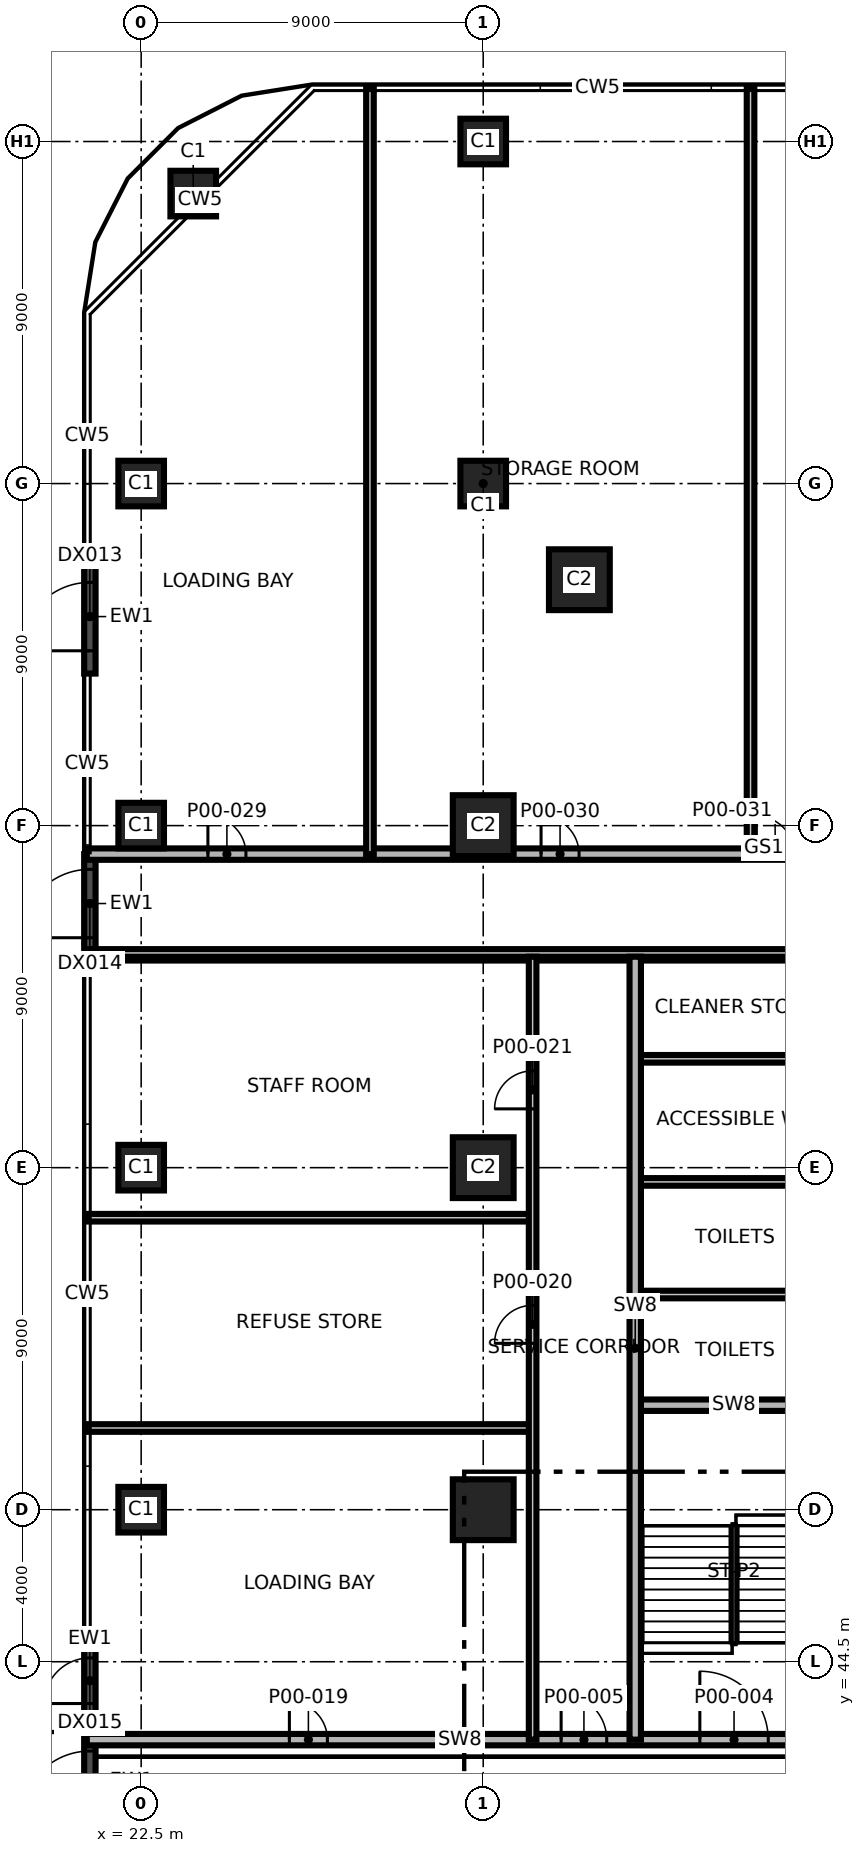
"""IFC4 building model, lengths in metres.
Left out: names, types, materials, properties, quantities, classifications, styles, units other than length and angle.
Written with IfcOpenShell. Run it as: python <this file> out.ifc"""

import sys

from ifc_helpers import new_model, si_unit, direction, frame, frame_2d, origin, origin_2d, place, context, subcontext, project, spatial, rectangle, extrude, element, fill, save


model = new_model("IFC4")
c1 = context("Model", 3, precision=1e-05, world=origin(), true_north=direction((0.0, 1.0)))
c2 = subcontext(c1, "Body", "Model", "MODEL_VIEW")
j1 = project(units=[si_unit("LENGTHUNIT", "METRE"), si_unit("PLANEANGLEUNIT", "RADIAN")], contexts=[c1])
p1 = place(None, origin())
s1 = spatial("IfcSite", under=j1, at=p1, CompositionType="ELEMENT")
p2 = place(p1, origin())
s2 = spatial("IfcBuilding", under=s1, at=p2, CompositionType="ELEMENT")
p3 = place(p2, origin())
s3 = spatial("IfcBuildingStorey", under=s2, at=p3, CompositionType="ELEMENT", Elevation=0.0)
p4 = place(p3, frame((22.5, 48.5, 0.0), z_axis=(0.0, 0.0, 1.0), x_axis=(1.0, 0.0, 0.0)))
e1 = element("IfcColumn", 1, at=p4, inside=s3, PredefinedType="COLUMN", context=c2, shape_type="SweptSolid", body=[
    extrude(rectangle(XDim=1.2, YDim=1.2, at=origin_2d()), origin(), (0.0, 0.0, 1.0), 8.0),
])
p5 = place(p3, frame((31.5, 48.5, 0.0), z_axis=(0.0, 0.0, 1.0), x_axis=(1.0, 0.0, 0.0)))
e2 = element("IfcColumn", 2, at=p5, inside=s3, PredefinedType="COLUMN", context=c2, shape_type="SweptSolid", body=[
    extrude(rectangle(XDim=1.6, YDim=1.6, at=origin_2d()), origin(), (0.0, 0.0, 1.0), 8.0),
])
p6 = place(p3, frame((22.5, 57.5, 0.0), z_axis=(0.0, 0.0, 1.0), x_axis=(1.0, 0.0, 0.0)))
e3 = element("IfcColumn", 3, at=p6, inside=s3, PredefinedType="COLUMN", context=c2, shape_type="SweptSolid", body=[
    extrude(rectangle(XDim=1.2, YDim=1.2, at=origin_2d()), origin(), (0.0, 0.0, 1.0), 8.0),
])
p7 = place(p3, frame((31.5, 57.5, 0.0), z_axis=(0.0, 0.0, 1.0), x_axis=(1.0, 0.0, 0.0)))
e4 = element("IfcColumn", 4, at=p7, inside=s3, PredefinedType="COLUMN", context=c2, shape_type="SweptSolid", body=[
    extrude(rectangle(XDim=1.6, YDim=1.6, at=origin_2d()), origin(), (0.0, 0.0, 1.0), 8.0),
])
p8 = place(p3, frame((22.5, 66.5, 0.0), z_axis=(0.0, 0.0, 1.0), x_axis=(1.0, 0.0, 0.0)))
e5 = element("IfcColumn", 5, at=p8, inside=s3, PredefinedType="COLUMN", context=c2, shape_type="SweptSolid", body=[
    extrude(rectangle(XDim=1.2, YDim=1.2, at=origin_2d()), origin(), (0.0, 0.0, 1.0), 8.0),
])
p9 = place(p3, frame((31.5, 66.5, 0.0), z_axis=(0.0, 0.0, 1.0), x_axis=(1.0, 0.0, 0.0)))
e6 = element("IfcColumn", 6, at=p9, inside=s3, PredefinedType="COLUMN", context=c2, shape_type="SweptSolid", body=[
    extrude(rectangle(XDim=1.6, YDim=1.6, at=origin_2d()), origin(), (0.0, 0.0, 1.0), 8.0),
])
for number, where, z_axis, x_axis in (
    (7, (22.5, 75.5, 0.0), (0.0, 0.0, 1.0), (1.0, 0.0, 0.0)),
    (8, (31.5, 75.5, 0.0), (0.0, 0.0, 1.0), (1.0, 0.0, 0.0)),
    (9, (23.87, 83.13, 0.0), (0.0, 0.0, 1.0), (1.0, 0.0, 0.0)),
    (10, (31.5, 84.5, 0.0), (0.0, 0.0, 1.0), (1.0, 0.0, 0.0)),
):
    element("IfcColumn", number, at=place(p3, frame(where, z_axis=z_axis, x_axis=x_axis)), inside=s3, PredefinedType="COLUMN", context=c2, shape_type="SweptSolid", body=[
        extrude(rectangle(XDim=1.2, YDim=1.2, at=origin_2d()), origin(), (0.0, 0.0, 1.0), 8.0),
    ])
p10 = place(p3, frame((34.03, 72.97, 0.0), z_axis=(0.0, 0.0, 1.0), x_axis=(1.0, 0.0, 0.0)))
e11 = element("IfcColumn", 11, at=p10, inside=s3, PredefinedType="COLUMN", context=c2, shape_type="SweptSolid", body=[
    extrude(rectangle(XDim=1.6, YDim=1.6, at=origin_2d()), origin(), (0.0, 0.0, 1.0), 8.0),
])
p11 = place(p3, frame((21.15, 70.5, 0.0), z_axis=(0.0, 0.0, 1.0), x_axis=(0.0, 1.0, 0.0)))
e12 = element("IfcWall", 12, at=p11, inside=s3, PredefinedType="SOLIDWALL", context=c2, shape_type="SweptSolid", body=[
    extrude(rectangle(XDim=3.0, YDim=0.3, at=frame_2d((1.5, 0.0))), origin(), (0.0, 0.0, 1.0), 7.7),
])
p12 = place(p11, frame((0.6, 0.0, 0.0)))
e13 = element("IfcOpeningElement", 13, at=p12, cuts=e12, PredefinedType="OPENING", context=c2, shape_type="SweptSolid", body=[
    extrude(rectangle(XDim=1.8, YDim=2.4, at=frame_2d((0.9, 1.2))), frame((0.0, 0.16, 0.0), z_axis=(0.0, -1.0, 0.0), x_axis=(1.0, 0.0, 0.0)), (0.0, 0.0, 1.0), 0.32),
])
p13 = place(p3, frame((21.15, 63.15, 0.0), z_axis=(0.0, 0.0, 1.0), x_axis=(0.0, 1.0, 0.0)))
e14 = element("IfcWall", 14, at=p13, inside=s3, PredefinedType="SOLIDWALL", context=c2, shape_type="SweptSolid", body=[
    extrude(rectangle(XDim=2.6, YDim=0.3, at=frame_2d((1.3, 0.0))), origin(), (0.0, 0.0, 1.0), 7.7),
])
p14 = place(p13, frame((0.4, 0.0, 0.0)))
e15 = element("IfcOpeningElement", 15, at=p14, cuts=e14, PredefinedType="OPENING", context=c2, shape_type="SweptSolid", body=[
    extrude(rectangle(XDim=1.8, YDim=2.4, at=frame_2d((0.9, 1.2))), frame((0.0, 0.16, 0.0), z_axis=(0.0, -1.0, 0.0), x_axis=(1.0, 0.0, 0.0)), (0.0, 0.0, 1.0), 0.32),
])
p15 = place(p3, frame((21.15, 42.8, 0.0), z_axis=(0.0, 0.0, 1.0), x_axis=(0.0, 1.0, 0.0)))
e16 = element("IfcWall", 16, at=p15, inside=s3, PredefinedType="SOLIDWALL", context=c2, shape_type="SweptSolid", body=[
    extrude(rectangle(XDim=2.4, YDim=0.3, at=frame_2d((1.2, 0.0))), origin(), (0.0, 0.0, 1.0), 7.7),
])
p16 = place(p15, frame((0.6, 0.0, 0.0)))
e17 = element("IfcOpeningElement", 17, at=p16, cuts=e16, PredefinedType="OPENING", context=c2, shape_type="SweptSolid", body=[
    extrude(rectangle(XDim=1.2, YDim=2.4, at=frame_2d((0.6, 1.2))), frame((0.0, 0.16, 0.0), z_axis=(0.0, -1.0, 0.0), x_axis=(1.0, 0.0, 0.0)), (0.0, 0.0, 1.0), 0.32),
])
p17 = place(p3, frame((21.15, 40.05, 0.0), z_axis=(0.0, 0.0, 1.0), x_axis=(0.0, 1.0, 0.0)))
e18 = element("IfcWall", 18, at=p17, inside=s3, PredefinedType="SOLIDWALL", context=c2, shape_type="SweptSolid", body=[
    extrude(rectangle(XDim=2.6, YDim=0.3, at=frame_2d((1.3, 0.0))), origin(), (0.0, 0.0, 1.0), 7.7),
])
p18 = place(p17, frame((0.3, 0.0, 0.0)))
e19 = element("IfcOpeningElement", 19, at=p18, cuts=e18, PredefinedType="OPENING", context=c2, shape_type="SweptSolid", body=[
    extrude(rectangle(XDim=1.8, YDim=2.4, at=frame_2d((0.9, 1.2))), frame((0.0, 0.16, 0.0), z_axis=(0.0, -1.0, 0.0), x_axis=(1.0, 0.0, 0.0)), (0.0, 0.0, 1.0), 0.32),
])
p19 = place(p3, frame((21.07, 42.45, 0.0), z_axis=(0.0, 0.0, 1.0), x_axis=(1.0, 0.0, 0.0)))
e20 = element("IfcWall", 20, at=p19, inside=s3, PredefinedType="SHEAR", context=c2, shape_type="SweptSolid", body=[
    extrude(rectangle(XDim=19.63, YDim=0.3, at=frame_2d((9.815, 0.0))), origin(), (0.0, 0.0, 1.0), 7.7),
])
p20 = place(p19, frame((16.13, 0.0, 0.0)))
e21 = element("IfcOpeningElement", 21, at=p20, cuts=e20, PredefinedType="OPENING", context=c2, shape_type="SweptSolid", body=[
    extrude(rectangle(XDim=1.8, YDim=2.1, at=frame_2d((0.9, 1.05))), frame((0.0, 0.16, 0.0), z_axis=(0.0, -1.0, 0.0), x_axis=(1.0, 0.0, 0.0)), (0.0, 0.0, 1.0), 0.32),
])
p21 = place(p19, frame((12.48, 0.0, 0.0)))
e22 = element("IfcOpeningElement", 22, at=p21, cuts=e20, PredefinedType="OPENING", context=c2, shape_type="SweptSolid", body=[
    extrude(rectangle(XDim=1.2, YDim=2.1, at=frame_2d((0.6, 1.05))), frame((0.0, 0.16, 0.0), z_axis=(0.0, -1.0, 0.0), x_axis=(1.0, 0.0, 0.0)), (0.0, 0.0, 1.0), 0.32),
])
p22 = place(p19, frame((5.33, 0.0, 0.0)))
e23 = element("IfcOpeningElement", 23, at=p22, cuts=e20, PredefinedType="OPENING", context=c2, shape_type="SweptSolid", body=[
    extrude(rectangle(XDim=1.0, YDim=2.1, at=frame_2d((0.5, 1.05))), frame((0.0, 0.16, 0.0), z_axis=(0.0, -1.0, 0.0), x_axis=(1.0, 0.0, 0.0)), (0.0, 0.0, 1.0), 0.32),
])
p23 = place(p3, frame((21.07, 50.65, 0.0), z_axis=(0.0, 0.0, 1.0), x_axis=(1.0, 0.0, 0.0)))
e24 = element("IfcWall", 24, at=p23, inside=s3, PredefinedType="PARTITIONING", context=c2, shape_type="SweptSolid", body=[
    extrude(rectangle(XDim=11.73, YDim=0.2, at=frame_2d((5.865, 0.0))), origin(), (0.0, 0.0, 1.0), 6.8),
])
p24 = place(p3, frame((35.5, 51.25, 0.0), z_axis=(0.0, 0.0, 1.0), x_axis=(1.0, 0.0, 0.0)))
e25 = element("IfcWall", 25, at=p24, inside=s3, PredefinedType="SHEAR", context=c2, shape_type="SweptSolid", body=[
    extrude(rectangle(XDim=5.2, YDim=0.3, at=frame_2d((2.6, 0.0))), origin(), (0.0, 0.0, 1.0), 7.7),
])
p25 = place(p3, frame((35.55, 54.162, 0.0), z_axis=(0.0, 0.0, 1.0), x_axis=(1.0, 0.0, 0.0)))
e26 = element("IfcWall", 26, at=p25, inside=s3, PredefinedType="PARTITIONING", context=c2, shape_type="SweptSolid", body=[
    extrude(rectangle(XDim=5.15, YDim=0.2, at=frame_2d((2.575, 0.0))), origin(), (0.0, 0.0, 1.0), 7.7),
])
p26 = place(p3, frame((21.07, 56.183, 0.0), z_axis=(0.0, 0.0, 1.0), x_axis=(1.0, 0.0, 0.0)))
e27 = element("IfcWall", 27, at=p26, inside=s3, PredefinedType="PARTITIONING", context=c2, shape_type="SweptSolid", body=[
    extrude(rectangle(XDim=11.73, YDim=0.2, at=frame_2d((5.865, 0.0))), origin(), (0.0, 0.0, 1.0), 6.8),
])
for number, where, z_axis, x_axis in (
    (28, (35.55, 57.125, 0.0), (0.0, 0.0, 1.0), (1.0, 0.0, 0.0)),
    (29, (35.55, 60.364, 0.0), (0.0, 0.0, 1.0), (1.0, 0.0, 0.0)),
):
    element("IfcWall", number, at=place(p3, frame(where, z_axis=z_axis, x_axis=x_axis)), inside=s3, PredefinedType="PARTITIONING", context=c2, shape_type="SweptSolid", body=[
        extrude(rectangle(XDim=5.15, YDim=0.2, at=frame_2d((2.575, 0.0))), origin(), (0.0, 0.0, 1.0), 7.7),
    ])
p27 = place(p3, frame((21.07, 63.05, 0.0), z_axis=(0.0, 0.0, 1.0), x_axis=(1.0, 0.0, 0.0)))
e30 = element("IfcWall", 30, at=p27, inside=s3, PredefinedType="PARTITIONING", context=c2, shape_type="SweptSolid", body=[
    extrude(rectangle(XDim=14.43, YDim=0.2, at=frame_2d((7.215, 0.0))), origin(), (0.0, 0.0, 1.0), 6.8),
])
p28 = place(p3, frame((35.55, 63.05, 0.0), z_axis=(0.0, 0.0, 1.0), x_axis=(1.0, 0.0, 0.0)))
e31 = element("IfcWall", 31, at=p28, inside=s3, PredefinedType="PARTITIONING", context=c2, shape_type="SweptSolid", body=[
    extrude(rectangle(XDim=5.15, YDim=0.2, at=frame_2d((2.575, 0.0))), origin(), (0.0, 0.0, 1.0), 7.7),
])
p29 = place(p3, frame((21.07, 63.15, 0.0), z_axis=(0.0, 0.0, 1.0), x_axis=(1.0, 0.0, 0.0)))
e32 = element("IfcWall", 32, at=p29, inside=s3, PredefinedType="PARTITIONING", context=c2, shape_type="SweptSolid", body=[
    extrude(rectangle(XDim=19.63, YDim=0.2, at=frame_2d((9.815, 0.0))), origin(), (0.0, 0.0, 1.0), 6.8),
])
p30 = place(p3, frame((21.07, 65.75, 0.0), z_axis=(0.0, 0.0, 1.0), x_axis=(1.0, 0.0, 0.0)))
e33 = element("IfcWall", 33, at=p30, inside=s3, PredefinedType="SHEAR", context=c2, shape_type="SweptSolid", body=[
    extrude(rectangle(XDim=38.86, YDim=0.3, at=frame_2d((19.43, 0.0))), origin(), (0.0, 0.0, 1.0), 7.7),
])
p31 = place(p30, frame((20.68, 0.0, 0.0)))
e34 = element("IfcOpeningElement", 34, at=p31, cuts=e33, PredefinedType="OPENING", context=c2, shape_type="SweptSolid", body=[
    extrude(rectangle(XDim=1.2, YDim=2.1, at=frame_2d((0.6, 1.05))), frame((0.0, 0.16, 0.0), z_axis=(0.0, -1.0, 0.0), x_axis=(1.0, 0.0, 0.0)), (0.0, 0.0, 1.0), 0.32),
])
p32 = place(p30, frame((3.186, 0.0, 0.0)))
e35 = element("IfcOpeningElement", 35, at=p32, cuts=e33, PredefinedType="OPENING", context=c2, shape_type="SweptSolid", body=[
    extrude(rectangle(XDim=1.0, YDim=2.1, at=frame_2d((0.5, 1.05))), frame((0.0, 0.16, 0.0), z_axis=(0.0, -1.0, 0.0), x_axis=(1.0, 0.0, 0.0)), (0.0, 0.0, 1.0), 0.32),
])
p33 = place(p30, frame((11.952, 0.0, 0.0)))
e36 = element("IfcOpeningElement", 36, at=p33, cuts=e33, PredefinedType="OPENING", context=c2, shape_type="SweptSolid", body=[
    extrude(rectangle(XDim=1.0, YDim=2.1, at=frame_2d((0.5, 1.05))), frame((0.0, 0.16, 0.0), z_axis=(0.0, -1.0, 0.0), x_axis=(1.0, 0.0, 0.0)), (0.0, 0.0, 1.0), 0.32),
])
p34 = place(p30, frame((17.615, 0.0, 0.0)))
e37 = element("IfcOpeningElement", 37, at=p34, cuts=e33, PredefinedType="OPENING", context=c2, shape_type="SweptSolid", body=[
    extrude(rectangle(XDim=1.0, YDim=2.1, at=frame_2d((0.5, 1.05))), frame((0.0, 0.16, 0.0), z_axis=(0.0, -1.0, 0.0), x_axis=(1.0, 0.0, 0.0)), (0.0, 0.0, 1.0), 0.32),
])
p35 = place(p30, frame((26.43, 0.0, 0.0)))
e38 = element("IfcOpeningElement", 38, at=p35, cuts=e33, PredefinedType="OPENING", context=c2, shape_type="SweptSolid", body=[
    extrude(rectangle(XDim=1.0, YDim=2.1, at=frame_2d((0.5, 1.05))), frame((0.0, 0.16, 0.0), z_axis=(0.0, -1.0, 0.0), x_axis=(1.0, 0.0, 0.0)), (0.0, 0.0, 1.0), 0.32),
])
p36 = place(p30, frame((35.18, 0.0, 0.0)))
e39 = element("IfcOpeningElement", 39, at=p36, cuts=e33, PredefinedType="OPENING", context=c2, shape_type="SweptSolid", body=[
    extrude(rectangle(XDim=1.0, YDim=2.1, at=frame_2d((0.5, 1.05))), frame((0.0, 0.16, 0.0), z_axis=(0.0, -1.0, 0.0), x_axis=(1.0, 0.0, 0.0)), (0.0, 0.0, 1.0), 0.32),
])
p37 = place(p3, frame((28.52, 65.75, 0.0), z_axis=(0.0, 0.0, 1.0), x_axis=(0.0, 1.0, 0.0)))
e40 = element("IfcWall", 40, at=p37, inside=s3, PredefinedType="PARTITIONING", context=c2, shape_type="SweptSolid", body=[
    extrude(rectangle(XDim=20.18, YDim=0.2, at=frame_2d((10.09, 0.0))), origin(), (0.0, 0.0, 1.0), 6.8),
])
p38 = place(p3, frame((32.8, 42.45, 0.0), z_axis=(0.0, 0.0, 1.0), x_axis=(0.0, 1.0, 0.0)))
e41 = element("IfcWall", 41, at=p38, inside=s3, PredefinedType="PARTITIONING", context=c2, shape_type="SweptSolid", body=[
    extrude(rectangle(XDim=20.6, YDim=0.2, at=frame_2d((10.3, 0.0))), origin(), (0.0, 0.0, 1.0), 7.7),
])
p39 = place(p38, frame((10.428, 0.0, 0.0)))
e42 = element("IfcOpeningElement", 42, at=p39, cuts=e41, PredefinedType="OPENING", context=c2, shape_type="SweptSolid", body=[
    extrude(rectangle(XDim=1.0, YDim=2.1, at=frame_2d((0.5, 1.05))), frame((0.0, 0.11, 0.0), z_axis=(0.0, -1.0, 0.0), x_axis=(1.0, 0.0, 0.0)), (0.0, 0.0, 1.0), 0.22),
])
p40 = place(p38, frame((16.597, 0.0, 0.0)))
e43 = element("IfcOpeningElement", 43, at=p40, cuts=e41, PredefinedType="OPENING", context=c2, shape_type="SweptSolid", body=[
    extrude(rectangle(XDim=1.0, YDim=2.1, at=frame_2d((0.5, 1.05))), frame((0.0, 0.11, 0.0), z_axis=(0.0, -1.0, 0.0), x_axis=(1.0, 0.0, 0.0)), (0.0, 0.0, 1.0), 0.22),
])
p41 = place(p3, frame((35.5, 42.45, 0.0), z_axis=(0.0, 0.0, 1.0), x_axis=(0.0, 1.0, 0.0)))
e44 = element("IfcWall", 44, at=p41, inside=s3, PredefinedType="SHEAR", context=c2, shape_type="SweptSolid", body=[
    extrude(rectangle(XDim=20.6, YDim=0.3, at=frame_2d((10.3, 0.0))), origin(), (0.0, 0.0, 1.0), 7.7),
])
p42 = place(p3, frame((38.534, 65.75, 0.0), z_axis=(0.0, 0.0, 1.0), x_axis=(0.0, 1.0, 0.0)))
e45 = element("IfcWall", 45, at=p42, inside=s3, PredefinedType="PARTITIONING", context=c2, shape_type="SweptSolid", body=[
    extrude(rectangle(XDim=20.18, YDim=0.2, at=frame_2d((10.09, 0.0))), origin(), (0.0, 0.0, 1.0), 6.8),
])
p43 = place(p12, origin())
e46 = element("IfcDoor", 46, at=p43, inside=s3, OperationType="SINGLE_SWING_LEFT", PredefinedType="DOOR", context=c2, shape_type="SweptSolid", body=[
    extrude(rectangle(XDim=1.8, YDim=2.4, at=frame_2d((0.9, 1.2))), frame((0.0, 0.025, 0.0), z_axis=(0.0, -1.0, 0.0), x_axis=(1.0, 0.0, 0.0)), (0.0, 0.0, 1.0), 0.05),
])
fill(e13, e46)
p44 = place(p14, origin())
e47 = element("IfcDoor", 47, at=p44, inside=s3, OperationType="SINGLE_SWING_LEFT", PredefinedType="DOOR", context=c2, shape_type="SweptSolid", body=[
    extrude(rectangle(XDim=1.8, YDim=2.4, at=frame_2d((0.9, 1.2))), frame((0.0, 0.025, 0.0), z_axis=(0.0, -1.0, 0.0), x_axis=(1.0, 0.0, 0.0)), (0.0, 0.0, 1.0), 0.05),
])
fill(e15, e47)
p45 = place(p16, origin())
e48 = element("IfcDoor", 48, at=p45, inside=s3, OperationType="SINGLE_SWING_LEFT", PredefinedType="DOOR", context=c2, shape_type="SweptSolid", body=[
    extrude(rectangle(XDim=1.2, YDim=2.4, at=frame_2d((0.6, 1.2))), frame((0.0, 0.025, 0.0), z_axis=(0.0, -1.0, 0.0), x_axis=(1.0, 0.0, 0.0)), (0.0, 0.0, 1.0), 0.05),
])
fill(e17, e48)
p46 = place(p18, origin())
e49 = element("IfcDoor", 49, at=p46, inside=s3, OperationType="SINGLE_SWING_LEFT", PredefinedType="DOOR", context=c2, shape_type="SweptSolid", body=[
    extrude(rectangle(XDim=1.8, YDim=2.4, at=frame_2d((0.9, 1.2))), frame((0.0, 0.025, 0.0), z_axis=(0.0, -1.0, 0.0), x_axis=(1.0, 0.0, 0.0)), (0.0, 0.0, 1.0), 0.05),
])
fill(e19, e49)
p47 = place(p20, origin())
e50 = element("IfcDoor", 50, at=p47, inside=s3, OperationType="SINGLE_SWING_RIGHT", PredefinedType="DOOR", context=c2, shape_type="SweptSolid", body=[
    extrude(rectangle(XDim=1.8, YDim=2.1, at=frame_2d((0.9, 1.05))), frame((0.0, 0.025, 0.0), z_axis=(0.0, -1.0, 0.0), x_axis=(1.0, 0.0, 0.0)), (0.0, 0.0, 1.0), 0.05),
])
fill(e21, e50)
p48 = place(p21, origin())
e51 = element("IfcDoor", 51, at=p48, inside=s3, OperationType="SINGLE_SWING_LEFT", PredefinedType="DOOR", context=c2, shape_type="SweptSolid", body=[
    extrude(rectangle(XDim=1.2, YDim=2.1, at=frame_2d((0.6, 1.05))), frame((0.0, 0.025, 0.0), z_axis=(0.0, -1.0, 0.0), x_axis=(1.0, 0.0, 0.0)), (0.0, 0.0, 1.0), 0.05),
])
fill(e22, e51)
p49 = place(p22, origin())
e52 = element("IfcDoor", 52, at=p49, inside=s3, OperationType="SINGLE_SWING_LEFT", PredefinedType="DOOR", context=c2, shape_type="SweptSolid", body=[
    extrude(rectangle(XDim=1.0, YDim=2.1, at=frame_2d((0.5, 1.05))), frame((0.0, 0.025, 0.0), z_axis=(0.0, -1.0, 0.0), x_axis=(1.0, 0.0, 0.0)), (0.0, 0.0, 1.0), 0.05),
])
fill(e23, e52)
p50 = place(p39, origin())
e53 = element("IfcDoor", 53, at=p50, inside=s3, OperationType="SINGLE_SWING_RIGHT", PredefinedType="DOOR", context=c2, shape_type="SweptSolid", body=[
    extrude(rectangle(XDim=1.0, YDim=2.1, at=frame_2d((0.5, 1.05))), frame((0.0, 0.025, 0.0), z_axis=(0.0, -1.0, 0.0), x_axis=(1.0, 0.0, 0.0)), (0.0, 0.0, 1.0), 0.05),
])
fill(e42, e53)
p51 = place(p40, origin())
e54 = element("IfcDoor", 54, at=p51, inside=s3, OperationType="SINGLE_SWING_LEFT", PredefinedType="DOOR", context=c2, shape_type="SweptSolid", body=[
    extrude(rectangle(XDim=1.0, YDim=2.1, at=frame_2d((0.5, 1.05))), frame((0.0, 0.025, 0.0), z_axis=(0.0, -1.0, 0.0), x_axis=(1.0, 0.0, 0.0)), (0.0, 0.0, 1.0), 0.05),
])
fill(e43, e54)
p52 = place(p32, origin())
e55 = element("IfcDoor", 55, at=p52, inside=s3, OperationType="SINGLE_SWING_LEFT", PredefinedType="DOOR", context=c2, shape_type="SweptSolid", body=[
    extrude(rectangle(XDim=1.0, YDim=2.1, at=frame_2d((0.5, 1.05))), frame((0.0, 0.025, 0.0), z_axis=(0.0, -1.0, 0.0), x_axis=(1.0, 0.0, 0.0)), (0.0, 0.0, 1.0), 0.05),
])
fill(e35, e55)
p53 = place(p33, origin())
e56 = element("IfcDoor", 56, at=p53, inside=s3, OperationType="SINGLE_SWING_RIGHT", PredefinedType="DOOR", context=c2, shape_type="SweptSolid", body=[
    extrude(rectangle(XDim=1.0, YDim=2.1, at=frame_2d((0.5, 1.05))), frame((0.0, 0.025, 0.0), z_axis=(0.0, -1.0, 0.0), x_axis=(1.0, 0.0, 0.0)), (0.0, 0.0, 1.0), 0.05),
])
fill(e36, e56)
p54 = place(p34, origin())
e57 = element("IfcDoor", 57, at=p54, inside=s3, OperationType="SINGLE_SWING_LEFT", PredefinedType="DOOR", context=c2, shape_type="SweptSolid", body=[
    extrude(rectangle(XDim=1.0, YDim=2.1, at=frame_2d((0.5, 1.05))), frame((0.0, 0.025, 0.0), z_axis=(0.0, -1.0, 0.0), x_axis=(1.0, 0.0, 0.0)), (0.0, 0.0, 1.0), 0.05),
])
fill(e37, e57)
save(model, sys.argv[1])
